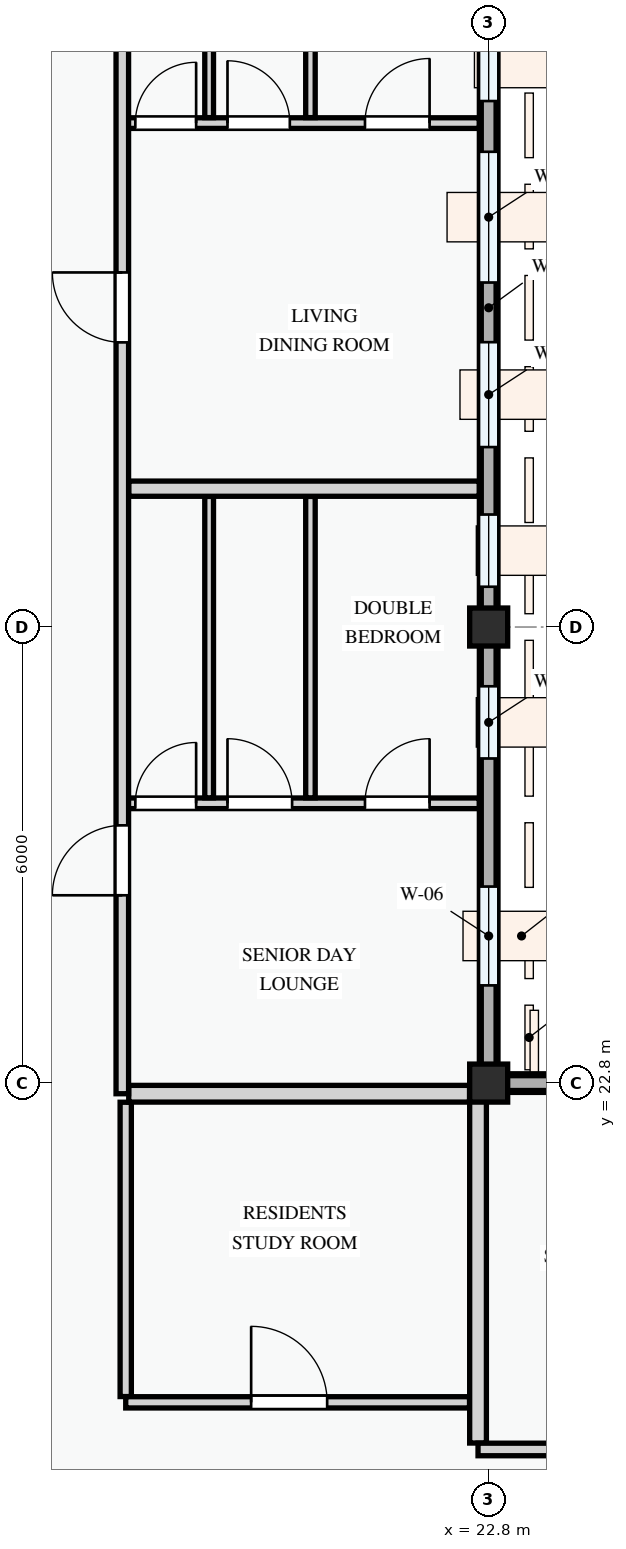
"""IFC4 building model, lengths in metres.
Left out: names, types, materials, properties, quantities, classifications, styles, units other than length and angle.
Written with IfcOpenShell. Run it as: python <this file> out.ifc"""

import sys

from ifc_helpers import new_model, si_unit, direction, frame, frame_2d, origin, origin_2d, place, context, subcontext, project, spatial, rectangle, extrude, element, fill, save


model = new_model("IFC4")
c1 = context("Model", 3, precision=1e-05, world=origin(), true_north=direction((0.0, 1.0)))
c2 = subcontext(c1, "Body", "Model", "MODEL_VIEW")
j1 = project(units=[si_unit("LENGTHUNIT", "METRE"), si_unit("PLANEANGLEUNIT", "RADIAN")], contexts=[c1])
p1 = place(None, origin())
s1 = spatial("IfcSite", under=j1, at=p1, CompositionType="ELEMENT")
p2 = place(p1, origin())
s2 = spatial("IfcBuilding", under=s1, at=p2, CompositionType="ELEMENT")
p3 = place(p2, frame((0.0, 0.0, 34.5)))
s3 = spatial("IfcBuildingStorey", under=s2, at=p3, CompositionType="ELEMENT", Elevation=34.5)
for number, where, z_axis, x_axis in (
    (1, (22.8, 22.8, 0.0), (0.0, 0.0, 1.0), (1.0, 0.0, 0.0)),
    (2, (22.8, 28.8, 0.0), (0.0, 0.0, 1.0), (1.0, 0.0, 0.0)),
):
    element("IfcColumn", number, at=place(p3, frame(where, z_axis=z_axis, x_axis=x_axis)), inside=s3, PredefinedType="COLUMN", context=c2, shape_type="SweptSolid", body=[
        extrude(rectangle(XDim=0.5, YDim=0.5, at=origin_2d()), origin(), (0.0, 0.0, 1.0), 3.3),
    ])
p4 = place(p3, frame((22.8, 22.8, 0.0), z_axis=(0.0, 0.0, 1.0), x_axis=(0.0, 1.0, 0.0)))
e3 = element("IfcWall", 3, at=p4, inside=s3, PredefinedType="STANDARD", context=c2, shape_type="SweptSolid", body=[
    extrude(rectangle(XDim=6.0, YDim=0.245, at=frame_2d((3.0, 0.0))), origin(), (0.0, 0.0, 1.0), 2.575),
])
p5 = place(p4, frame((1.285, 0.0, 0.78)))
e4 = element("IfcOpeningElement", 4, at=p5, cuts=e3, PredefinedType="OPENING", context=c2, shape_type="SweptSolid", body=[
    extrude(rectangle(XDim=1.3, YDim=1.4, at=frame_2d((0.65, 0.7))), frame((0.0, 0.133, 0.0), z_axis=(0.0, -1.0, 0.0), x_axis=(1.0, 0.0, 0.0)), (0.0, 0.0, 1.0), 0.265),
])
p6 = place(p4, frame((4.271, 0.0, 0.78)))
e5 = element("IfcOpeningElement", 5, at=p6, cuts=e3, PredefinedType="OPENING", context=c2, shape_type="SweptSolid", body=[
    extrude(rectangle(XDim=0.95, YDim=1.15, at=frame_2d((0.475, 0.575))), frame((0.0, 0.133, 0.0), z_axis=(0.0, -1.0, 0.0), x_axis=(1.0, 0.0, 0.0)), (0.0, 0.0, 1.0), 0.265),
])
p7 = place(p3, frame((22.8, 28.8, 0.0), z_axis=(0.0, 0.0, 1.0), x_axis=(0.0, 1.0, 0.0)))
e6 = element("IfcWall", 6, at=p7, inside=s3, PredefinedType="STANDARD", context=c2, shape_type="SweptSolid", body=[
    extrude(rectangle(XDim=8.4, YDim=0.245, at=frame_2d((4.2, 0.0))), origin(), (0.0, 0.0, 1.0), 2.425),
])
p8 = place(p7, frame((0.53, 0.0, 0.78)))
e7 = element("IfcOpeningElement", 7, at=p8, cuts=e6, PredefinedType="OPENING", context=c2, shape_type="SweptSolid", body=[
    extrude(rectangle(XDim=0.95, YDim=1.15, at=frame_2d((0.475, 0.575))), frame((0.0, 0.133, 0.0), z_axis=(0.0, -1.0, 0.0), x_axis=(1.0, 0.0, 0.0)), (0.0, 0.0, 1.0), 0.265),
])
p9 = place(p7, frame((2.367, 0.0, 0.78)))
e8 = element("IfcOpeningElement", 8, at=p9, cuts=e6, PredefinedType="OPENING", context=c2, shape_type="SweptSolid", body=[
    extrude(rectangle(XDim=1.38, YDim=1.48, at=frame_2d((0.69, 0.74))), frame((0.0, 0.133, 0.0), z_axis=(0.0, -1.0, 0.0), x_axis=(1.0, 0.0, 0.0)), (0.0, 0.0, 1.0), 0.265),
])
p10 = place(p7, frame((4.532, 0.0, 0.78)))
e9 = element("IfcOpeningElement", 9, at=p10, cuts=e6, PredefinedType="OPENING", context=c2, shape_type="SweptSolid", body=[
    extrude(rectangle(XDim=1.72, YDim=1.52, at=frame_2d((0.86, 0.76))), frame((0.0, 0.133, 0.0), z_axis=(0.0, -1.0, 0.0), x_axis=(1.0, 0.0, 0.0)), (0.0, 0.0, 1.0), 0.265),
])
p11 = place(p7, frame((6.92, 0.0, 0.78)))
e10 = element("IfcOpeningElement", 10, at=p11, cuts=e6, PredefinedType="OPENING", context=c2, shape_type="SweptSolid", body=[
    extrude(rectangle(XDim=1.0, YDim=1.25, at=frame_2d((0.5, 0.625))), frame((0.0, 0.133, 0.0), z_axis=(0.0, -1.0, 0.0), x_axis=(1.0, 0.0, 0.0)), (0.0, 0.0, 1.0), 0.265),
])
p12 = place(p3, frame((28.8, 22.8, 0.0), z_axis=(0.0, 0.0, 1.0), x_axis=(-1.0, 0.0, 0.0)))
e11 = element("IfcWall", 11, at=p12, inside=s3, PredefinedType="STANDARD", context=c2, shape_type="SweptSolid", body=[
    extrude(rectangle(XDim=6.0, YDim=0.245, at=frame_2d((3.0, 0.0))), origin(), (0.0, 0.0, 1.0), 2.525),
])
p13 = place(p12, frame((0.729, 0.0, 0.78)))
e12 = element("IfcOpeningElement", 12, at=p13, cuts=e11, PredefinedType="OPENING", context=c2, shape_type="SweptSolid", body=[
    extrude(rectangle(XDim=1.05, YDim=1.2, at=frame_2d((0.525, 0.6))), frame((0.0, 0.133, 0.0), z_axis=(0.0, -1.0, 0.0), x_axis=(1.0, 0.0, 0.0)), (0.0, 0.0, 1.0), 0.265),
])
p14 = place(p12, frame((3.025, 0.0, 0.78)))
e13 = element("IfcOpeningElement", 13, at=p14, cuts=e11, PredefinedType="OPENING", context=c2, shape_type="SweptSolid", body=[
    extrude(rectangle(XDim=2.08, YDim=1.52, at=frame_2d((1.04, 0.76))), frame((0.0, 0.133, 0.0), z_axis=(0.0, -1.0, 0.0), x_axis=(1.0, 0.0, 0.0)), (0.0, 0.0, 1.0), 0.265),
])
for number, where, z_axis, x_axis in (
    (14, (22.8, 22.8, 3.3), (0.0, 0.0, 1.0), (0.0, 1.0, 0.0)),
    (15, (43.2, 22.8, 3.3), (0.0, 0.0, 1.0), (-1.0, 0.0, 0.0)),
):
    element("IfcWall", number, at=place(p3, frame(where, z_axis=z_axis, x_axis=x_axis)), inside=s3, PredefinedType="PARAPET", context=c2, shape_type="SweptSolid", body=[
        extrude(rectangle(XDim=20.4, YDim=0.195, at=frame_2d((10.2, 0.0))), origin(), (0.0, 0.0, 1.0), 1.15),
    ])
p15 = place(p3, frame((18.025, 18.676, 0.0), z_axis=(0.0, 0.0, 1.0), x_axis=(0.0, 1.0, 0.0)))
e16 = element("IfcWall", 16, at=p15, inside=s3, PredefinedType="PARTITIONING", context=c2, shape_type="SweptSolid", body=[
    extrude(rectangle(XDim=3.872, YDim=0.148, at=frame_2d((1.936, 0.0))), origin(), (0.0, 0.0, 1.0), 3.0),
])
p16 = place(p3, frame((18.025, 18.6, 0.0), z_axis=(0.0, 0.0, 1.0), x_axis=(1.0, 0.0, 0.0)))
e17 = element("IfcWall", 17, at=p16, inside=s3, PredefinedType="PARTITIONING", context=c2, shape_type="SweptSolid", body=[
    extrude(rectangle(XDim=4.523, YDim=0.148, at=frame_2d((2.262, 0.0))), origin(), (0.0, 0.0, 1.0), 3.0),
])
p17 = place(p16, frame((1.65, 0.0, 0.0)))
e18 = element("IfcOpeningElement", 18, at=p17, cuts=e17, PredefinedType="OPENING", context=c2, shape_type="SweptSolid", body=[
    extrude(rectangle(XDim=1.0, YDim=2.15, at=frame_2d((0.5, 1.075))), frame((0.0, 0.084, 0.0), z_axis=(0.0, -1.0, 0.0), x_axis=(1.0, 0.0, 0.0)), (0.0, 0.0, 1.0), 0.168),
])
p18 = place(p3, frame((17.98, 26.481, 0.0), z_axis=(0.0, 0.0, 1.0), x_axis=(1.0, 0.0, 0.0)))
e19 = element("IfcWall", 19, at=p18, inside=s3, PredefinedType="PARTITIONING", context=c2, shape_type="SweptSolid", body=[
    extrude(rectangle(XDim=4.696, YDim=0.14, at=frame_2d((2.348, 0.0))), origin(), (0.0, 0.0, 1.0), 3.0),
])
p19 = place(p18, frame((0.171, 0.0, 0.0)))
e20 = element("IfcOpeningElement", 20, at=p19, cuts=e19, PredefinedType="OPENING", context=c2, shape_type="SweptSolid", body=[
    extrude(rectangle(XDim=0.8, YDim=2.1, at=frame_2d((0.4, 1.05))), frame((0.0, 0.08, 0.0), z_axis=(0.0, -1.0, 0.0), x_axis=(1.0, 0.0, 0.0)), (0.0, 0.0, 1.0), 0.16),
])
p20 = place(p18, frame((1.384, 0.0, 0.0)))
e21 = element("IfcOpeningElement", 21, at=p20, cuts=e19, PredefinedType="OPENING", context=c2, shape_type="SweptSolid", body=[
    extrude(rectangle(XDim=0.85, YDim=2.1, at=frame_2d((0.425, 1.05))), frame((0.0, 0.08, 0.0), z_axis=(0.0, -1.0, 0.0), x_axis=(1.0, 0.0, 0.0)), (0.0, 0.0, 1.0), 0.16),
])
p21 = place(p18, frame((3.193, 0.0, 0.0)))
e22 = element("IfcOpeningElement", 22, at=p21, cuts=e19, PredefinedType="OPENING", context=c2, shape_type="SweptSolid", body=[
    extrude(rectangle(XDim=0.85, YDim=2.1, at=frame_2d((0.425, 1.05))), frame((0.0, 0.08, 0.0), z_axis=(0.0, -1.0, 0.0), x_axis=(1.0, 0.0, 0.0)), (0.0, 0.0, 1.0), 0.16),
])
p22 = place(p3, frame((20.455, 26.553, 0.0), z_axis=(0.0, 0.0, 1.0), x_axis=(0.0, 1.0, 0.0)))
e23 = element("IfcWall", 23, at=p22, inside=s3, PredefinedType="PARTITIONING", context=c2, shape_type="SweptSolid", body=[
    extrude(rectangle(XDim=3.965, YDim=0.125, at=frame_2d((1.983, 0.0))), origin(), (0.0, 0.0, 1.0), 3.0),
])
p23 = place(p3, frame((19.122, 26.553, 0.0), z_axis=(0.0, 0.0, 1.0), x_axis=(0.0, 1.0, 0.0)))
e24 = element("IfcWall", 24, at=p23, inside=s3, PredefinedType="PARTITIONING", context=c2, shape_type="SweptSolid", body=[
    extrude(rectangle(XDim=3.965, YDim=0.115, at=frame_2d((1.983, 0.0))), origin(), (0.0, 0.0, 1.0), 3.0),
])
p24 = place(p3, frame((18.064, 22.66, 0.0), z_axis=(0.0, 0.0, 1.0), x_axis=(1.0, 0.0, 0.0)))
e25 = element("IfcWall", 25, at=p24, inside=s3, PredefinedType="PARTITIONING", context=c2, shape_type="SweptSolid", body=[
    extrude(rectangle(XDim=4.484, YDim=0.22, at=frame_2d((2.242, 0.0))), origin(), (0.0, 0.0, 1.0), 2.375),
])
p25 = place(p3, frame((17.98, 35.43, 0.0), z_axis=(0.0, 0.0, 1.0), x_axis=(1.0, 0.0, 0.0)))
e26 = element("IfcWall", 26, at=p25, inside=s3, PredefinedType="PARTITIONING", context=c2, shape_type="SweptSolid", body=[
    extrude(rectangle(XDim=4.696, YDim=0.14, at=frame_2d((2.348, 0.0))), origin(), (0.0, 0.0, 1.0), 3.0),
])
p26 = place(p25, frame((0.171, 0.0, 0.0)))
e27 = element("IfcOpeningElement", 27, at=p26, cuts=e26, PredefinedType="OPENING", context=c2, shape_type="SweptSolid", body=[
    extrude(rectangle(XDim=0.8, YDim=2.1, at=frame_2d((0.4, 1.05))), frame((0.0, 0.08, 0.0), z_axis=(0.0, -1.0, 0.0), x_axis=(1.0, 0.0, 0.0)), (0.0, 0.0, 1.0), 0.16),
])
p27 = place(p25, frame((1.384, 0.0, 0.0)))
e28 = element("IfcOpeningElement", 28, at=p27, cuts=e26, PredefinedType="OPENING", context=c2, shape_type="SweptSolid", body=[
    extrude(rectangle(XDim=0.82, YDim=2.08, at=frame_2d((0.41, 1.04))), frame((0.0, 0.08, 0.0), z_axis=(0.0, -1.0, 0.0), x_axis=(1.0, 0.0, 0.0)), (0.0, 0.0, 1.0), 0.16),
])
p28 = place(p25, frame((3.193, 0.0, 0.0)))
e29 = element("IfcOpeningElement", 29, at=p28, cuts=e26, PredefinedType="OPENING", context=c2, shape_type="SweptSolid", body=[
    extrude(rectangle(XDim=0.85, YDim=2.1, at=frame_2d((0.425, 1.05))), frame((0.0, 0.08, 0.0), z_axis=(0.0, -1.0, 0.0), x_axis=(1.0, 0.0, 0.0)), (0.0, 0.0, 1.0), 0.16),
])
p29 = place(p3, frame((20.455, 35.502, 0.0), z_axis=(0.0, 0.0, 1.0), x_axis=(0.0, 1.0, 0.0)))
e30 = element("IfcWall", 30, at=p29, inside=s3, PredefinedType="PARTITIONING", context=c2, shape_type="SweptSolid", body=[
    extrude(rectangle(XDim=7.574, YDim=0.125, at=frame_2d((3.787, 0.0))), origin(), (0.0, 0.0, 1.0), 3.0),
])
p30 = place(p3, frame((19.122, 35.502, 0.0), z_axis=(0.0, 0.0, 1.0), x_axis=(0.0, 1.0, 0.0)))
e31 = element("IfcWall", 31, at=p30, inside=s3, PredefinedType="PARTITIONING", context=c2, shape_type="SweptSolid", body=[
    extrude(rectangle(XDim=7.574, YDim=0.115, at=frame_2d((3.787, 0.0))), origin(), (0.0, 0.0, 1.0), 3.0),
])
p31 = place(p3, frame((18.064, 30.62, 0.0), z_axis=(0.0, 0.0, 1.0), x_axis=(1.0, 0.0, 0.0)))
e32 = element("IfcWall", 32, at=p31, inside=s3, PredefinedType="PARTITIONING", context=c2, shape_type="SweptSolid", body=[
    extrude(rectangle(XDim=4.611, YDim=0.2, at=frame_2d((2.306, 0.0))), origin(), (0.0, 0.0, 1.0), 3.0),
])
p32 = place(p3, frame((17.98, 22.66, 0.0), z_axis=(0.0, 0.0, 1.0), x_axis=(0.0, 1.0, 0.0)))
e33 = element("IfcWall", 33, at=p32, inside=s3, PredefinedType="PARTITIONING", context=c2, shape_type="SweptSolid", body=[
    extrude(rectangle(XDim=20.416, YDim=0.165, at=frame_2d((10.208, 0.0))), origin(), (0.0, 0.0, 1.0), 3.0),
])
p33 = place(p32, frame((2.611, 0.0, 0.0)))
e34 = element("IfcOpeningElement", 34, at=p33, cuts=e33, PredefinedType="OPENING", context=c2, shape_type="SweptSolid", body=[
    extrude(rectangle(XDim=0.92, YDim=2.1, at=frame_2d((0.46, 1.05))), frame((0.0, 0.093, 0.0), z_axis=(0.0, -1.0, 0.0), x_axis=(1.0, 0.0, 0.0)), (0.0, 0.0, 1.0), 0.185),
])
p34 = place(p32, frame((9.885, 0.0, 0.0)))
e35 = element("IfcOpeningElement", 35, at=p34, cuts=e33, PredefinedType="OPENING", context=c2, shape_type="SweptSolid", body=[
    extrude(rectangle(XDim=0.92, YDim=2.1, at=frame_2d((0.46, 1.05))), frame((0.0, 0.093, 0.0), z_axis=(0.0, -1.0, 0.0), x_axis=(1.0, 0.0, 0.0)), (0.0, 0.0, 1.0), 0.185),
])
p35 = place(p3, frame((22.66, 18.064, 0.0), z_axis=(0.0, 0.0, 1.0), x_axis=(0.0, 1.0, 0.0)))
e36 = element("IfcWall", 36, at=p35, inside=s3, PredefinedType="PARTITIONING", context=c2, shape_type="SweptSolid", body=[
    extrude(rectangle(XDim=4.676, YDim=0.22, at=frame_2d((2.338, 0.0))), origin(), (0.0, 0.0, 1.0), 2.425),
])
p36 = place(p3, frame((22.66, 17.98, 0.0), z_axis=(0.0, 0.0, 1.0), x_axis=(1.0, 0.0, 0.0)))
e37 = element("IfcWall", 37, at=p36, inside=s3, PredefinedType="PARTITIONING", context=c2, shape_type="SweptSolid", body=[
    extrude(rectangle(XDim=20.416, YDim=0.165, at=frame_2d((10.208, 0.0))), origin(), (0.0, 0.0, 1.0), 3.0),
])
p37 = place(p36, frame((2.611, 0.0, 0.0)))
e38 = element("IfcOpeningElement", 38, at=p37, cuts=e37, PredefinedType="OPENING", context=c2, shape_type="SweptSolid", body=[
    extrude(rectangle(XDim=0.92, YDim=2.1, at=frame_2d((0.46, 1.05))), frame((0.0, 0.093, 0.0), z_axis=(0.0, -1.0, 0.0), x_axis=(1.0, 0.0, 0.0)), (0.0, 0.0, 1.0), 0.185),
])
p38 = place(p36, frame((9.885, 0.0, 0.0)))
e39 = element("IfcOpeningElement", 39, at=p38, cuts=e37, PredefinedType="OPENING", context=c2, shape_type="SweptSolid", body=[
    extrude(rectangle(XDim=0.96, YDim=2.12, at=frame_2d((0.48, 1.06))), frame((0.0, 0.093, 0.0), z_axis=(0.0, -1.0, 0.0), x_axis=(1.0, 0.0, 0.0)), (0.0, 0.0, 1.0), 0.185),
])
p39 = place(p5, origin())
e40 = element("IfcWindow", 40, at=p39, inside=s3, PartitioningType="SINGLE_PANEL", PredefinedType="WINDOW", context=c2, shape_type="SweptSolid", body=[
    extrude(rectangle(XDim=1.3, YDim=1.4, at=frame_2d((0.65, 0.7))), frame((0.0, 0.03, 0.0), z_axis=(0.0, -1.0, 0.0), x_axis=(1.0, 0.0, 0.0)), (0.0, 0.0, 1.0), 0.06),
])
fill(e4, e40)
p40 = place(p6, origin())
e41 = element("IfcWindow", 41, at=p40, inside=s3, PartitioningType="SINGLE_PANEL", PredefinedType="WINDOW", context=c2, shape_type="SweptSolid", body=[
    extrude(rectangle(XDim=0.95, YDim=1.15, at=frame_2d((0.475, 0.575))), frame((0.0, 0.03, 0.0), z_axis=(0.0, -1.0, 0.0), x_axis=(1.0, 0.0, 0.0)), (0.0, 0.0, 1.0), 0.06),
])
fill(e5, e41)
p41 = place(p8, origin())
e42 = element("IfcWindow", 42, at=p41, inside=s3, PartitioningType="SINGLE_PANEL", PredefinedType="WINDOW", context=c2, shape_type="SweptSolid", body=[
    extrude(rectangle(XDim=0.95, YDim=1.15, at=frame_2d((0.475, 0.575))), frame((0.0, 0.03, 0.0), z_axis=(0.0, -1.0, 0.0), x_axis=(1.0, 0.0, 0.0)), (0.0, 0.0, 1.0), 0.06),
])
fill(e7, e42)
p42 = place(p9, origin())
e43 = element("IfcWindow", 43, at=p42, inside=s3, PartitioningType="SINGLE_PANEL", PredefinedType="WINDOW", context=c2, shape_type="SweptSolid", body=[
    extrude(rectangle(XDim=1.38, YDim=1.48, at=frame_2d((0.69, 0.74))), frame((0.0, 0.03, 0.0), z_axis=(0.0, -1.0, 0.0), x_axis=(1.0, 0.0, 0.0)), (0.0, 0.0, 1.0), 0.06),
])
fill(e8, e43)
p43 = place(p10, origin())
e44 = element("IfcWindow", 44, at=p43, inside=s3, PartitioningType="DOUBLE_PANEL_VERTICAL", PredefinedType="WINDOW", context=c2, shape_type="SweptSolid", body=[
    extrude(rectangle(XDim=1.72, YDim=1.52, at=frame_2d((0.86, 0.76))), frame((0.0, 0.03, 0.0), z_axis=(0.0, -1.0, 0.0), x_axis=(1.0, 0.0, 0.0)), (0.0, 0.0, 1.0), 0.06),
])
fill(e9, e44)
p44 = place(p11, origin())
e45 = element("IfcWindow", 45, at=p44, inside=s3, PartitioningType="SINGLE_PANEL", PredefinedType="WINDOW", context=c2, shape_type="SweptSolid", body=[
    extrude(rectangle(XDim=1.0, YDim=1.25, at=frame_2d((0.5, 0.625))), frame((0.0, 0.03, 0.0), z_axis=(0.0, -1.0, 0.0), x_axis=(1.0, 0.0, 0.0)), (0.0, 0.0, 1.0), 0.06),
])
fill(e10, e45)
p45 = place(p17, origin())
e46 = element("IfcDoor", 46, at=p45, inside=s3, OperationType="SINGLE_SWING_LEFT", PredefinedType="DOOR", context=c2, shape_type="SweptSolid", body=[
    extrude(rectangle(XDim=1.0, YDim=2.15, at=frame_2d((0.5, 1.075))), frame((0.0, 0.025, 0.0), z_axis=(0.0, -1.0, 0.0), x_axis=(1.0, 0.0, 0.0)), (0.0, 0.0, 1.0), 0.05),
])
fill(e18, e46)
p46 = place(p19, origin())
e47 = element("IfcDoor", 47, at=p46, inside=s3, OperationType="SINGLE_SWING_RIGHT", PredefinedType="DOOR", context=c2, shape_type="SweptSolid", body=[
    extrude(rectangle(XDim=0.8, YDim=2.1, at=frame_2d((0.4, 1.05))), frame((0.0, 0.025, 0.0), z_axis=(0.0, -1.0, 0.0), x_axis=(1.0, 0.0, 0.0)), (0.0, 0.0, 1.0), 0.05),
])
fill(e20, e47)
p47 = place(p20, origin())
e48 = element("IfcDoor", 48, at=p47, inside=s3, OperationType="SINGLE_SWING_LEFT", PredefinedType="DOOR", context=c2, shape_type="SweptSolid", body=[
    extrude(rectangle(XDim=0.85, YDim=2.1, at=frame_2d((0.425, 1.05))), frame((0.0, 0.025, 0.0), z_axis=(0.0, -1.0, 0.0), x_axis=(1.0, 0.0, 0.0)), (0.0, 0.0, 1.0), 0.05),
])
fill(e21, e48)
p48 = place(p21, origin())
e49 = element("IfcDoor", 49, at=p48, inside=s3, OperationType="SINGLE_SWING_RIGHT", PredefinedType="DOOR", context=c2, shape_type="SweptSolid", body=[
    extrude(rectangle(XDim=0.85, YDim=2.1, at=frame_2d((0.425, 1.05))), frame((0.0, 0.025, 0.0), z_axis=(0.0, -1.0, 0.0), x_axis=(1.0, 0.0, 0.0)), (0.0, 0.0, 1.0), 0.05),
])
fill(e22, e49)
p49 = place(p26, origin())
e50 = element("IfcDoor", 50, at=p49, inside=s3, OperationType="SINGLE_SWING_RIGHT", PredefinedType="DOOR", context=c2, shape_type="SweptSolid", body=[
    extrude(rectangle(XDim=0.8, YDim=2.1, at=frame_2d((0.4, 1.05))), frame((0.0, 0.025, 0.0), z_axis=(0.0, -1.0, 0.0), x_axis=(1.0, 0.0, 0.0)), (0.0, 0.0, 1.0), 0.05),
])
fill(e27, e50)
p50 = place(p27, origin())
e51 = element("IfcDoor", 51, at=p50, inside=s3, OperationType="SINGLE_SWING_LEFT", PredefinedType="DOOR", context=c2, shape_type="SweptSolid", body=[
    extrude(rectangle(XDim=0.82, YDim=2.08, at=frame_2d((0.41, 1.04))), frame((0.0, 0.025, 0.0), z_axis=(0.0, -1.0, 0.0), x_axis=(1.0, 0.0, 0.0)), (0.0, 0.0, 1.0), 0.05),
])
fill(e28, e51)
p51 = place(p28, origin())
e52 = element("IfcDoor", 52, at=p51, inside=s3, OperationType="SINGLE_SWING_RIGHT", PredefinedType="DOOR", context=c2, shape_type="SweptSolid", body=[
    extrude(rectangle(XDim=0.85, YDim=2.1, at=frame_2d((0.425, 1.05))), frame((0.0, 0.025, 0.0), z_axis=(0.0, -1.0, 0.0), x_axis=(1.0, 0.0, 0.0)), (0.0, 0.0, 1.0), 0.05),
])
fill(e29, e52)
p52 = place(p33, origin())
e53 = element("IfcDoor", 53, at=p52, inside=s3, OperationType="SINGLE_SWING_LEFT", PredefinedType="DOOR", context=c2, shape_type="SweptSolid", body=[
    extrude(rectangle(XDim=0.92, YDim=2.1, at=frame_2d((0.46, 1.05))), frame((0.0, 0.025, 0.0), z_axis=(0.0, -1.0, 0.0), x_axis=(1.0, 0.0, 0.0)), (0.0, 0.0, 1.0), 0.05),
])
fill(e34, e53)
p53 = place(p34, origin())
e54 = element("IfcDoor", 54, at=p53, inside=s3, OperationType="SINGLE_SWING_RIGHT", PredefinedType="DOOR", context=c2, shape_type="SweptSolid", body=[
    extrude(rectangle(XDim=0.92, YDim=2.1, at=frame_2d((0.46, 1.05))), frame((0.0, 0.025, 0.0), z_axis=(0.0, -1.0, 0.0), x_axis=(1.0, 0.0, 0.0)), (0.0, 0.0, 1.0), 0.05),
])
fill(e35, e54)
save(model, sys.argv[1])
